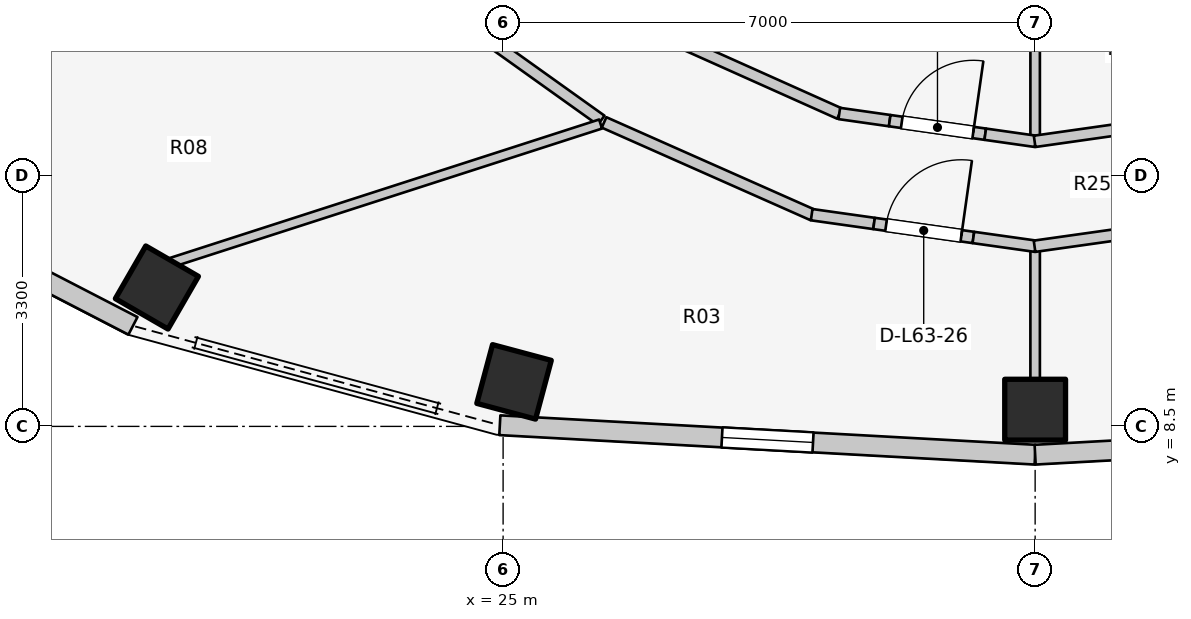
"""IFC4 building model, lengths in metres.
Left out: names, types, materials, properties, quantities, classifications, styles, units other than length and angle.
Written with IfcOpenShell. Run it as: python <this file> out.ifc"""

import sys

from ifc_helpers import new_model, si_unit, direction, frame, frame_2d, origin, origin_2d, place, context, subcontext, project, spatial, rectangle, extrude, element, fill, save


model = new_model("IFC4")
c1 = context("Model", 3, precision=1e-05, world=origin(), true_north=direction((0.0, 1.0)))
c2 = subcontext(c1, "Body", "Model", "MODEL_VIEW")
j1 = project(units=[si_unit("LENGTHUNIT", "METRE"), si_unit("PLANEANGLEUNIT", "RADIAN")], contexts=[c1])
p1 = place(None, origin())
s1 = spatial("IfcSite", under=j1, at=p1, CompositionType="ELEMENT")
p2 = place(p1, origin())
s2 = spatial("IfcBuilding", under=s1, at=p2, CompositionType="ELEMENT")
p3 = place(p2, frame((0.0, 0.0, 207.8)))
s3 = spatial("IfcBuildingStorey", under=s2, at=p3, CompositionType="ELEMENT", Elevation=207.8)
for number, where, z_axis, x_axis in (
    (1, (20.445, 10.327, 0.0), (0.0, 0.0, 1.0), (-0.5, -0.866, 0.0)),
    (2, (25.144, 9.086, 0.0), (0.0, 0.0, 1.0), (-0.259, -0.966, 0.0)),
    (3, (32.0, 8.72, 0.0), (0.0, 0.0, 1.0), (0.0, -1.0, 0.0)),
):
    element("IfcColumn", number, at=place(p3, frame(where, z_axis=z_axis, x_axis=x_axis)), inside=s3, PredefinedType="COLUMN", context=c2, shape_type="SweptSolid", body=[
        extrude(rectangle(XDim=0.8, YDim=0.8, at=origin_2d()), origin(), (0.0, 0.0, 1.0), 3.1),
    ])
p4 = place(p3, frame((16.442, 11.728, 0.0), z_axis=(0.0, 0.0, 1.0), x_axis=(0.88849146803, -0.458893137057, 0.0)))
e4 = element("IfcWall", 4, at=p4, inside=s3, PredefinedType="STANDARD", context=c2, shape_type="SweptSolid", body=[
    extrude(rectangle(XDim=4.15, YDim=0.26, at=frame_2d((2.075, 0.0))), origin(), (0.0, 0.0, 1.0), 1.22),
])
p5 = place(p3, frame((24.957, 8.515, 0.0), z_axis=(0.0, 0.0, 1.0), x_axis=(0.998490239527, -0.054929423535, 0.0)))
e5 = element("IfcWall", 5, at=p5, inside=s3, PredefinedType="STANDARD", context=c2, shape_type="SweptSolid", body=[
    extrude(rectangle(XDim=7.054, YDim=0.26, at=frame_2d((3.527, 0.0))), origin(), (0.0, 0.0, 1.0), 1.22),
])
p6 = place(p5, frame((2.927, 0.0, 0.15)))
e6 = element("IfcOpeningElement", 6, at=p6, cuts=e5, PredefinedType="OPENING", context=c2, shape_type="SweptSolid", body=[
    extrude(rectangle(XDim=1.2, YDim=0.9, at=frame_2d((0.6, 0.45))), frame((0.0, 0.14, 0.0), z_axis=(0.0, -1.0, 0.0), x_axis=(1.0, 0.0, 0.0)), (0.0, 0.0, 1.0), 0.28),
])
p7 = place(p3, frame((32.0, 8.128, 0.0), z_axis=(0.0, 0.0, 1.0), x_axis=(0.998490239527, 0.054929423535, 0.0)))
e7 = element("IfcWall", 7, at=p7, inside=s3, PredefinedType="STANDARD", context=c2, shape_type="SweptSolid", body=[
    extrude(rectangle(XDim=7.054, YDim=0.26, at=frame_2d((3.527, 0.0))), origin(), (0.0, 0.0, 1.0), 1.22),
])
p8 = place(p7, frame((2.927, 0.0, 0.15)))
e8 = element("IfcOpeningElement", 8, at=p8, cuts=e7, PredefinedType="OPENING", context=c2, shape_type="SweptSolid", body=[
    extrude(rectangle(XDim=1.2, YDim=0.9, at=frame_2d((0.6, 0.45))), frame((0.0, 0.14, 0.0), z_axis=(0.0, -1.0, 0.0), x_axis=(1.0, 0.0, 0.0)), (0.0, 0.0, 1.0), 0.28),
])
p9 = place(p3, frame((32.0, 14.9, 0.0), z_axis=(0.0, 0.0, 1.0), x_axis=(0.0, -1.0, 0.0)))
e9 = element("IfcWall", 9, at=p9, inside=s3, PredefinedType="PARTITIONING", context=c2, shape_type="SweptSolid", body=[
    extrude(rectangle(XDim=2.65, YDim=0.125, at=frame_2d((1.325, 0.0))), origin(), (0.0, 0.0, 1.0), 1.22),
])
p10 = place(p3, frame((27.019, 13.694, 0.0), z_axis=(0.0, 0.0, 1.0), x_axis=(0.912628408652, -0.408790151203, 0.0)))
e10 = element("IfcWall", 10, at=p10, inside=s3, PredefinedType="PARTITIONING", context=c2, shape_type="SweptSolid", body=[
    extrude(rectangle(XDim=2.638, YDim=0.15, at=frame_2d((1.319, 0.0))), origin(), (0.0, 0.0, 1.0), 1.22),
])
p11 = place(p3, frame((29.423, 12.617, 0.0), z_axis=(0.0, 0.0, 1.0), x_axis=(0.990109198956, -0.140298874346, 0.0)))
e11 = element("IfcWall", 11, at=p11, inside=s3, PredefinedType="PARTITIONING", context=c2, shape_type="SweptSolid", body=[
    extrude(rectangle(XDim=0.67, YDim=0.15, at=frame_2d((0.335, 0.0))), origin(), (0.0, 0.0, 1.0), 2.575),
])
p12 = place(p3, frame((30.086, 12.523, 0.0), z_axis=(0.0, 0.0, 1.0), x_axis=(0.990049212475, -0.140721557967, 0.0)))
e12 = element("IfcWall", 12, at=p12, inside=s3, PredefinedType="PARTITIONING", context=c2, shape_type="SweptSolid", body=[
    extrude(rectangle(XDim=1.27, YDim=0.15, at=frame_2d((0.635, 0.0))), origin(), (0.0, 0.0, 1.0), 2.575),
])
p13 = place(p12, frame((0.16, 0.0, 0.0)))
e13 = element("IfcOpeningElement", 13, at=p13, cuts=e12, PredefinedType="OPENING", context=c2, shape_type="SweptSolid", body=[
    extrude(rectangle(XDim=0.95, YDim=2.1, at=frame_2d((0.475, 1.05))), frame((0.0, 0.085, 0.0), z_axis=(0.0, -1.0, 0.0), x_axis=(1.0, 0.0, 0.0)), (0.0, 0.0, 1.0), 0.17),
])
p14 = place(p3, frame((31.344, 12.344, 0.0), z_axis=(0.0, 0.0, 1.0), x_axis=(0.990102022055, -0.140349513436, 0.0)))
e14 = element("IfcWall", 14, at=p14, inside=s3, PredefinedType="PARTITIONING", context=c2, shape_type="SweptSolid", body=[
    extrude(rectangle(XDim=0.67, YDim=0.15, at=frame_2d((0.335, 0.0))), origin(), (0.0, 0.0, 1.0), 1.22),
])
p15 = place(p3, frame((31.993, 12.25, 0.0), z_axis=(0.0, 0.0, 1.0), x_axis=(0.990078185178, 0.140517569133, 0.0)))
e15 = element("IfcWall", 15, at=p15, inside=s3, PredefinedType="PARTITIONING", context=c2, shape_type="SweptSolid", body=[
    extrude(rectangle(XDim=2.61, YDim=0.15, at=frame_2d((1.305, 0.0))), origin(), (0.0, 0.0, 1.0), 1.22),
])
p16 = place(p3, frame((26.29, 12.527, 0.0), z_axis=(0.0, 0.0, 1.0), x_axis=(-0.813780999276, 0.581171648669, 0.0)))
e16 = element("IfcWall", 16, at=p16, inside=s3, PredefinedType="PARTITIONING", context=c2, shape_type="SweptSolid", body=[
    extrude(rectangle(XDim=2.082, YDim=0.15, at=frame_2d((1.041, 0.0))), origin(), (0.0, 0.0, 1.0), 1.22),
])
p17 = place(p3, frame((26.283, 12.478, 0.0), z_axis=(0.0, 0.0, 1.0), x_axis=(-0.951711719757, -0.306993163568, 0.0)))
e17 = element("IfcWall", 17, at=p17, inside=s3, PredefinedType="PARTITIONING", context=c2, shape_type="SweptSolid", body=[
    extrude(rectangle(XDim=5.934, YDim=0.125, at=frame_2d((2.967, 0.0))), origin(), (0.0, 0.0, 1.0), 1.22),
])
p18 = place(p3, frame((32.0, 10.815, 0.0), z_axis=(0.0, 0.0, 1.0), x_axis=(0.0, -1.0, 0.0)))
e18 = element("IfcWall", 18, at=p18, inside=s3, PredefinedType="PARTITIONING", context=c2, shape_type="SweptSolid", body=[
    extrude(rectangle(XDim=1.715, YDim=0.125, at=frame_2d((0.857, 0.0))), origin(), (0.0, 0.0, 1.0), 1.22),
])
p19 = place(p3, frame((26.328, 12.499, 0.0), z_axis=(0.0, 0.0, 1.0), x_axis=(0.914139569865, -0.405399613724, 0.0)))
e19 = element("IfcWall", 19, at=p19, inside=s3, PredefinedType="PARTITIONING", context=c2, shape_type="SweptSolid", body=[
    extrude(rectangle(XDim=3.005, YDim=0.15, at=frame_2d((1.502, 0.0))), origin(), (0.0, 0.0, 1.0), 1.22),
])
p20 = place(p3, frame((29.06, 11.285, 0.0), z_axis=(0.0, 0.0, 1.0), x_axis=(0.990241972526, -0.139358659032, 0.0)))
e20 = element("IfcWall", 20, at=p20, inside=s3, PredefinedType="PARTITIONING", context=c2, shape_type="SweptSolid", body=[
    extrude(rectangle(XDim=0.829, YDim=0.15, at=frame_2d((0.414, 0.0))), origin(), (0.0, 0.0, 1.0), 2.575),
])
p21 = place(p3, frame((29.88, 11.17, 0.0), z_axis=(0.0, 0.0, 1.0), x_axis=(0.990203107572, -0.139634543559, 0.0)))
e21 = element("IfcWall", 21, at=p21, inside=s3, PredefinedType="PARTITIONING", context=c2, shape_type="SweptSolid", body=[
    extrude(rectangle(XDim=1.32, YDim=0.15, at=frame_2d((0.66, 0.0))), origin(), (0.0, 0.0, 1.0), 2.575),
])
p22 = place(p21, frame((0.16, 0.0, 0.0)))
e22 = element("IfcOpeningElement", 22, at=p22, cuts=e21, PredefinedType="OPENING", context=c2, shape_type="SweptSolid", body=[
    extrude(rectangle(XDim=1.0, YDim=2.1, at=frame_2d((0.5, 1.05))), frame((0.0, 0.085, 0.0), z_axis=(0.0, -1.0, 0.0), x_axis=(1.0, 0.0, 0.0)), (0.0, 0.0, 1.0), 0.17),
])
p23 = place(p3, frame((31.188, 10.986, 0.0), z_axis=(0.0, 0.0, 1.0), x_axis=(0.990236248115, -0.139399328976, 0.0)))
e23 = element("IfcWall", 23, at=p23, inside=s3, PredefinedType="PARTITIONING", context=c2, shape_type="SweptSolid", body=[
    extrude(rectangle(XDim=0.828, YDim=0.15, at=frame_2d((0.414, 0.0))), origin(), (0.0, 0.0, 1.0), 1.22),
])
p24 = place(p3, frame((31.992, 10.87, 0.0), z_axis=(0.0, 0.0, 1.0), x_axis=(0.99022315503, 0.139492305317, 0.0)))
e24 = element("IfcWall", 24, at=p24, inside=s3, PredefinedType="PARTITIONING", context=c2, shape_type="SweptSolid", body=[
    extrude(rectangle(XDim=2.977, YDim=0.15, at=frame_2d((1.489, 0.0))), origin(), (0.0, 0.0, 1.0), 1.22),
])
p25 = place(p6, origin())
e25 = element("IfcWindow", 25, at=p25, inside=s3, PartitioningType="SINGLE_PANEL", PredefinedType="WINDOW", context=c2, shape_type="SweptSolid", body=[
    extrude(rectangle(XDim=1.2, YDim=0.9, at=frame_2d((0.6, 0.45))), frame((0.0, 0.03, 0.0), z_axis=(0.0, -1.0, 0.0), x_axis=(1.0, 0.0, 0.0)), (0.0, 0.0, 1.0), 0.06),
])
fill(e6, e25)
p26 = place(p13, origin())
e26 = element("IfcDoor", 26, at=p26, inside=s3, OperationType="SINGLE_SWING_RIGHT", PredefinedType="DOOR", context=c2, shape_type="SweptSolid", body=[
    extrude(rectangle(XDim=0.95, YDim=2.1, at=frame_2d((0.475, 1.05))), frame((0.0, 0.025, 0.0), z_axis=(0.0, -1.0, 0.0), x_axis=(1.0, 0.0, 0.0)), (0.0, 0.0, 1.0), 0.05),
])
fill(e13, e26)
p27 = place(p22, origin())
e27 = element("IfcDoor", 27, at=p27, inside=s3, OperationType="SINGLE_SWING_RIGHT", PredefinedType="DOOR", context=c2, shape_type="SweptSolid", body=[
    extrude(rectangle(XDim=1.0, YDim=2.1, at=frame_2d((0.5, 1.05))), frame((0.0, 0.025, 0.0), z_axis=(0.0, -1.0, 0.0), x_axis=(1.0, 0.0, 0.0)), (0.0, 0.0, 1.0), 0.05),
])
fill(e22, e27)
save(model, sys.argv[1])
